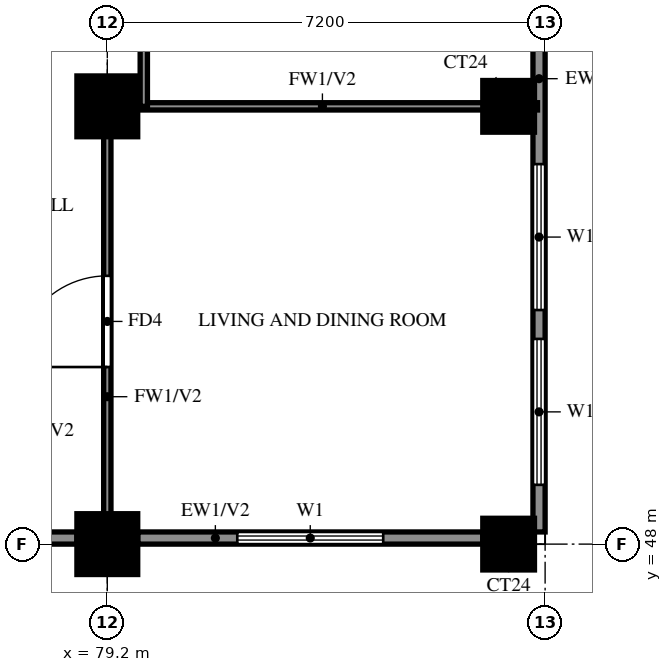
"""IFC4 building model, lengths in metres.
Left out: names, types, materials, properties, quantities, classifications, styles, units other than length and angle.
Written with IfcOpenShell. Run it as: python <this file> out.ifc"""

import sys

from ifc_helpers import new_model, si_unit, direction, frame, frame_2d, origin, origin_2d, place, context, subcontext, project, spatial, rectangle, extrude, source, transform, mapped, element, fill, save


model = new_model("IFC4")
c1 = context("Model", 3, precision=1e-05, world=origin(), true_north=direction((0.0, 1.0)))
c2 = subcontext(c1, "Body", "Model", "MODEL_VIEW")
j1 = project(units=[si_unit("LENGTHUNIT", "METRE"), si_unit("PLANEANGLEUNIT", "RADIAN")], contexts=[c1])
p1 = place(None, origin())
s1 = spatial("IfcSite", under=j1, at=p1, CompositionType="ELEMENT")
p2 = place(p1, origin())
s2 = spatial("IfcBuilding", under=s1, at=p2, CompositionType="ELEMENT")
p3 = place(p2, frame((0.0, 0.0, 171.0)))
s3 = spatial("IfcBuildingStorey", under=s2, at=p3, CompositionType="ELEMENT", Elevation=171.0)
m1 = source(origin(), c2, "Body", "SweptSolid", [
    extrude(rectangle(XDim=1.0, YDim=1.0, at=origin_2d()), origin(), (0.0, 0.0, 1.0), 3.2),
])
p4 = place(p3, frame((79.2, 48.0, 0.0), z_axis=(0.0, 0.0, 1.0), x_axis=(1.0, 0.0, 0.0)))
e1 = element("IfcColumn", 1, at=p4, inside=s3, PredefinedType="COLUMN", context=c2, shape_type="MappedRepresentation", body=[
    mapped(m1, transform((0.0, 0.0, 0.0))),
])
m2 = source(origin(), c2, "Body", "SweptSolid", [
    extrude(rectangle(XDim=0.85, YDim=0.85, at=origin_2d()), origin(), (0.0, 0.0, 1.0), 3.2),
])
p5 = place(p3, frame((85.8, 48.0, 0.0), z_axis=(0.0, 0.0, 1.0), x_axis=(1.0, 0.0, 0.0)))
e2 = element("IfcColumn", 2, at=p5, inside=s3, PredefinedType="COLUMN", context=c2, shape_type="MappedRepresentation", body=[
    mapped(m2, transform((0.0, 0.0, 0.0))),
])
p6 = place(p3, frame((79.2, 55.2, 0.0), z_axis=(0.0, 0.0, 1.0), x_axis=(1.0, 0.0, 0.0)))
e3 = element("IfcColumn", 3, at=p6, inside=s3, PredefinedType="COLUMN", context=c2, shape_type="MappedRepresentation", body=[
    mapped(m1, transform((0.0, 0.0, 0.0))),
])
p7 = place(p3, frame((85.8, 55.2, 0.0), z_axis=(0.0, 0.0, 1.0), x_axis=(1.0, 0.0, 0.0)))
e4 = element("IfcColumn", 4, at=p7, inside=s3, PredefinedType="COLUMN", context=c2, shape_type="MappedRepresentation", body=[
    mapped(m2, transform((0.0, 0.0, 0.0))),
])
p8 = place(p3, frame((85.719, 39.881, 0.0), z_axis=(0.0, 0.0, 1.0), x_axis=(-0.86377618652, 0.503875678716, 0.0)))
e5 = element("IfcWall", 5, at=p8, inside=s3, PredefinedType="SOLIDWALL", context=c2, shape_type="SweptSolid", body=[
    extrude(rectangle(XDim=16.311, YDim=0.2, at=frame_2d((8.156, 0.0))), origin(), (0.0, 0.0, 1.0), 3.2),
])
p9 = place(p8, frame((13.326, 0.0, 1.5)))
e6 = element("IfcOpeningElement", 6, at=p9, cuts=e5, PredefinedType="OPENING", context=c2, shape_type="SweptSolid", body=[
    extrude(rectangle(XDim=0.9, YDim=0.9, at=frame_2d((0.45, 0.45))), frame((0.0, 0.11, 0.0), z_axis=(0.0, -1.0, 0.0), x_axis=(1.0, 0.0, 0.0)), (0.0, 0.0, 1.0), 0.22),
])
p10 = place(p3, frame((71.99, 48.1, 0.0), z_axis=(0.0, 0.0, 1.0), x_axis=(1.0, 0.0, 0.0)))
e7 = element("IfcWall", 7, at=p10, inside=s3, PredefinedType="SOLIDWALL", context=c2, shape_type="SweptSolid", body=[
    extrude(rectangle(XDim=6.71, YDim=0.2, at=frame_2d((3.355, 0.0))), origin(), (0.0, 0.0, 1.0), 3.2),
])
p11 = place(p3, frame((79.7, 48.1, 0.0), z_axis=(0.0, 0.0, 1.0), x_axis=(1.0, 0.0, 0.0)))
e8 = element("IfcWall", 8, at=p11, inside=s3, PredefinedType="SOLIDWALL", context=c2, shape_type="SweptSolid", body=[
    extrude(rectangle(XDim=5.675, YDim=0.2, at=frame_2d((2.837, 0.0))), origin(), (0.0, 0.0, 1.0), 3.2),
])
p12 = place(p11, frame((1.637, 0.0, 0.6)))
e9 = element("IfcOpeningElement", 9, at=p12, cuts=e8, PredefinedType="OPENING", context=c2, shape_type="SweptSolid", body=[
    extrude(rectangle(XDim=2.4, YDim=2.4, at=frame_2d((1.2, 1.2))), frame((0.0, 0.11, 0.0), z_axis=(0.0, -1.0, 0.0), x_axis=(1.0, 0.0, 0.0)), (0.0, 0.0, 1.0), 0.22),
])
p13 = place(p3, frame((86.3, 48.2, 0.0), z_axis=(0.0, 0.0, 1.0), x_axis=(0.0, 1.0, 0.0)))
e10 = element("IfcWall", 10, at=p13, inside=s3, PredefinedType="SOLIDWALL", context=c2, shape_type="SweptSolid", body=[
    extrude(rectangle(XDim=14.2, YDim=0.2, at=frame_2d((7.1, 0.0))), origin(), (0.0, 0.0, 1.0), 3.2),
])
p14 = place(p13, frame((0.775, 0.0, 0.6)))
e11 = element("IfcOpeningElement", 11, at=p14, cuts=e10, PredefinedType="OPENING", context=c2, shape_type="SweptSolid", body=[
    extrude(rectangle(XDim=2.4, YDim=2.4, at=frame_2d((1.2, 1.2))), frame((0.0, 0.11, 0.0), z_axis=(0.0, -1.0, 0.0), x_axis=(1.0, 0.0, 0.0)), (0.0, 0.0, 1.0), 0.22),
])
p15 = place(p13, frame((3.65, 0.0, 0.6)))
e12 = element("IfcOpeningElement", 12, at=p15, cuts=e10, PredefinedType="OPENING", context=c2, shape_type="SweptSolid", body=[
    extrude(rectangle(XDim=2.4, YDim=2.4, at=frame_2d((1.2, 1.2))), frame((0.0, 0.11, 0.0), z_axis=(0.0, -1.0, 0.0), x_axis=(1.0, 0.0, 0.0)), (0.0, 0.0, 1.0), 0.22),
])
p16 = place(p13, frame((11.012, 0.0, 0.6)))
e13 = element("IfcOpeningElement", 13, at=p16, cuts=e10, PredefinedType="OPENING", context=c2, shape_type="SweptSolid", body=[
    extrude(rectangle(XDim=2.4, YDim=2.4, at=frame_2d((1.2, 1.2))), frame((0.0, 0.11, 0.0), z_axis=(0.0, -1.0, 0.0), x_axis=(1.0, 0.0, 0.0)), (0.0, 0.0, 1.0), 0.22),
])
p17 = place(p13, frame((8.538, 0.0, 1.5)))
e14 = element("IfcOpeningElement", 14, at=p17, cuts=e10, PredefinedType="OPENING", context=c2, shape_type="SweptSolid", body=[
    extrude(rectangle(XDim=0.9, YDim=0.9, at=frame_2d((0.45, 0.45))), frame((0.0, 0.11, 0.0), z_axis=(0.0, -1.0, 0.0), x_axis=(1.0, 0.0, 0.0)), (0.0, 0.0, 1.0), 0.22),
])
p18 = place(p3, frame((79.2, 55.2, 0.0), z_axis=(0.0, 0.0, 1.0), x_axis=(1.0, 0.0, 0.0)))
e15 = element("IfcWall", 15, at=p18, inside=s3, PredefinedType="PARTITIONING", context=c2, shape_type="SweptSolid", body=[
    extrude(rectangle(XDim=7.075, YDim=0.12, at=frame_2d((3.538, 0.0))), origin(), (0.0, 0.0, 1.0), 3.2),
])
p19 = place(p3, frame((79.2, 48.125, 0.0), z_axis=(0.0, 0.0, 1.0), x_axis=(0.0, 1.0, 0.0)))
e16 = element("IfcWall", 16, at=p19, inside=s3, PredefinedType="PARTITIONING", context=c2, shape_type="SweptSolid", body=[
    extrude(rectangle(XDim=7.075, YDim=0.12, at=frame_2d((3.538, 0.0))), origin(), (0.0, 0.0, 1.0), 3.2),
])
p20 = place(p19, frame((2.788, 0.0, 0.0)))
e17 = element("IfcOpeningElement", 17, at=p20, cuts=e16, PredefinedType="OPENING", context=c2, shape_type="SweptSolid", body=[
    extrude(rectangle(XDim=1.5, YDim=2.1, at=frame_2d((0.75, 1.05))), frame((0.0, 0.07, 0.0), z_axis=(0.0, -1.0, 0.0), x_axis=(1.0, 0.0, 0.0)), (0.0, 0.0, 1.0), 0.14),
])
p21 = place(p3, frame((79.8, 55.2, 0.0), z_axis=(0.0, 0.0, 1.0), x_axis=(0.0, 1.0, 0.0)))
e18 = element("IfcWall", 18, at=p21, inside=s3, PredefinedType="PARTITIONING", context=c2, shape_type="SweptSolid", body=[
    extrude(rectangle(XDim=3.6, YDim=0.12, at=frame_2d((1.8, 0.0))), origin(), (0.0, 0.0, 1.0), 3.2),
])
p22 = place(p12, origin())
e19 = element("IfcWindow", 19, at=p22, inside=s3, PartitioningType="DOUBLE_PANEL_VERTICAL", PredefinedType="WINDOW", context=c2, shape_type="SweptSolid", body=[
    extrude(rectangle(XDim=2.4, YDim=2.4, at=frame_2d((1.2, 1.2))), frame((0.0, 0.03, 0.0), z_axis=(0.0, -1.0, 0.0), x_axis=(1.0, 0.0, 0.0)), (0.0, 0.0, 1.0), 0.06),
])
fill(e9, e19)
p23 = place(p14, origin())
e20 = element("IfcWindow", 20, at=p23, inside=s3, PartitioningType="DOUBLE_PANEL_VERTICAL", PredefinedType="WINDOW", context=c2, shape_type="SweptSolid", body=[
    extrude(rectangle(XDim=2.4, YDim=2.4, at=frame_2d((1.2, 1.2))), frame((0.0, 0.03, 0.0), z_axis=(0.0, -1.0, 0.0), x_axis=(1.0, 0.0, 0.0)), (0.0, 0.0, 1.0), 0.06),
])
fill(e11, e20)
p24 = place(p15, origin())
e21 = element("IfcWindow", 21, at=p24, inside=s3, PartitioningType="DOUBLE_PANEL_VERTICAL", PredefinedType="WINDOW", context=c2, shape_type="SweptSolid", body=[
    extrude(rectangle(XDim=2.4, YDim=2.4, at=frame_2d((1.2, 1.2))), frame((0.0, 0.03, 0.0), z_axis=(0.0, -1.0, 0.0), x_axis=(1.0, 0.0, 0.0)), (0.0, 0.0, 1.0), 0.06),
])
fill(e12, e21)
p25 = place(p20, origin())
e22 = element("IfcDoor", 22, at=p25, inside=s3, OperationType="SINGLE_SWING_LEFT", PredefinedType="DOOR", context=c2, shape_type="SweptSolid", body=[
    extrude(rectangle(XDim=1.5, YDim=2.1, at=frame_2d((0.75, 1.05))), frame((0.0, 0.025, 0.0), z_axis=(0.0, -1.0, 0.0), x_axis=(1.0, 0.0, 0.0)), (0.0, 0.0, 1.0), 0.05),
])
fill(e17, e22)
save(model, sys.argv[1])
